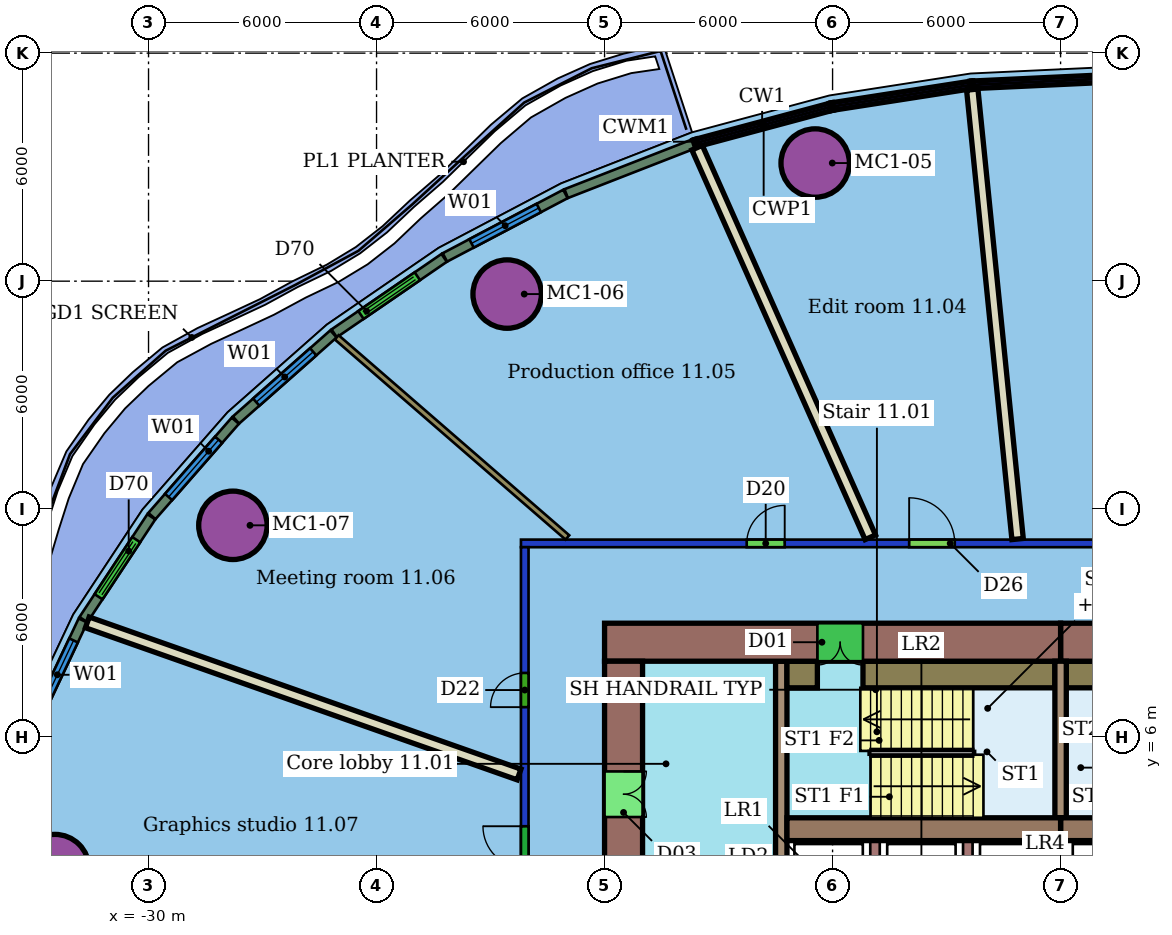
"""IFC4 building model, lengths in metres.
Left out: names, types, materials, properties, quantities, classifications, styles, units other than length and angle.
Written with IfcOpenShell. Run it as: python <this file> out.ifc"""

import sys

from ifc_helpers import new_model, si_unit, direction, frame, frame_2d, origin, origin_2d, place, context, subcontext, project, spatial, rectangle, hollow_circle, extrude, element, fill, save


model = new_model("IFC4")
c1 = context("Model", 3, precision=1e-05, world=origin(), true_north=direction((0.0, 1.0)))
c2 = subcontext(c1, "Body", "Model", "MODEL_VIEW")
j1 = project(units=[si_unit("LENGTHUNIT", "METRE"), si_unit("PLANEANGLEUNIT", "RADIAN")], contexts=[c1])
p1 = place(None, origin())
s1 = spatial("IfcSite", under=j1, at=p1, CompositionType="ELEMENT")
p2 = place(p1, origin())
s2 = spatial("IfcBuilding", under=s1, at=p2, CompositionType="ELEMENT")
p3 = place(p2, frame((0.0, 0.0, 58.2)))
s3 = spatial("IfcBuildingStorey", under=s2, at=p3, CompositionType="ELEMENT", Elevation=58.2)
for number, where, z_axis, x_axis in (
    (1, (-12.458, 21.108, 0.0), (0.0, 0.0, 1.0), (1.0, 0.0, 0.0)),
    (2, (-20.563, 17.66, 0.0), (0.0, 0.0, 1.0), (1.0, 0.0, 0.0)),
    (3, (-27.78, 11.576, 0.0), (0.0, 0.0, 1.0), (1.0, 0.0, 0.0)),
    (4, (-32.464, 2.543, 0.0), (0.0, 0.0, 1.0), (1.0, 0.0, 0.0)),
):
    element("IfcColumn", number, at=place(p3, frame(where, z_axis=z_axis, x_axis=x_axis)), inside=s3, PredefinedType="COLUMN", context=c2, shape_type="SweptSolid", body=[
        extrude(hollow_circle(Radius=0.9, WallThickness=0.06, at=origin_2d()), origin(), (0.0, 0.0, 1.0), 3.55),
    ])
p4 = place(p3, frame((-20.1, -11.0, 0.0), z_axis=(0.0, 0.0, 1.0), x_axis=(0.0, 1.0, 0.0)))
e5 = element("IfcWall", 5, at=p4, inside=s3, PredefinedType="PARTITIONING", context=c2, shape_type="SweptSolid", body=[
    extrude(rectangle(XDim=22.0, YDim=0.2, at=frame_2d((11.0, 0.0))), origin(), (0.0, 0.0, 1.0), 2.85),
])
p5 = place(p4, frame((17.792, 0.0, 0.0)))
e6 = element("IfcOpeningElement", 6, at=p5, cuts=e5, PredefinedType="OPENING", context=c2, shape_type="SweptSolid", body=[
    extrude(rectangle(XDim=0.9, YDim=2.1, at=frame_2d((0.45, 1.05))), frame((0.0, 0.11, 0.0), z_axis=(0.0, -1.0, 0.0), x_axis=(1.0, 0.0, 0.0)), (0.0, 0.0, 1.0), 0.22),
])
p6 = place(p4, frame((13.558, 0.0, 0.0)))
e7 = element("IfcOpeningElement", 7, at=p6, cuts=e5, PredefinedType="OPENING", context=c2, shape_type="SweptSolid", body=[
    extrude(rectangle(XDim=1.1, YDim=2.1, at=frame_2d((0.55, 1.05))), frame((0.0, 0.11, 0.0), z_axis=(0.0, -1.0, 0.0), x_axis=(1.0, 0.0, 0.0)), (0.0, 0.0, 1.0), 0.22),
])
p7 = place(p4, frame((6.45, 0.0, 0.0)))
e8 = element("IfcOpeningElement", 8, at=p7, cuts=e5, PredefinedType="OPENING", context=c2, shape_type="SweptSolid", body=[
    extrude(rectangle(XDim=0.9, YDim=2.1, at=frame_2d((0.45, 1.05))), frame((0.0, 0.11, 0.0), z_axis=(0.0, -1.0, 0.0), x_axis=(1.0, 0.0, 0.0)), (0.0, 0.0, 1.0), 0.22),
])
p8 = place(p4, frame((2.234, 0.0, 0.0)))
e9 = element("IfcOpeningElement", 9, at=p8, cuts=e5, PredefinedType="OPENING", context=c2, shape_type="SweptSolid", body=[
    extrude(rectangle(XDim=1.0, YDim=2.1, at=frame_2d((0.5, 1.05))), frame((0.0, 0.11, 0.0), z_axis=(0.0, -1.0, 0.0), x_axis=(1.0, 0.0, 0.0)), (0.0, 0.0, 1.0), 0.22),
])
p9 = place(p3, frame((-20.2, 11.1, 0.0), z_axis=(0.0, 0.0, 1.0), x_axis=(1.0, 0.0, 0.0)))
e10 = element("IfcWall", 10, at=p9, inside=s3, PredefinedType="PARTITIONING", context=c2, shape_type="SweptSolid", body=[
    extrude(rectangle(XDim=28.4, YDim=0.2, at=frame_2d((14.2, 0.0))), origin(), (0.0, 0.0, 1.0), 2.85),
])
p10 = place(p9, frame((24.235, 0.0, 0.0)))
e11 = element("IfcOpeningElement", 11, at=p10, cuts=e10, PredefinedType="OPENING", context=c2, shape_type="SweptSolid", body=[
    extrude(rectangle(XDim=1.5, YDim=2.1, at=frame_2d((0.75, 1.05))), frame((0.0, 0.11, 0.0), z_axis=(0.0, -1.0, 0.0), x_axis=(1.0, 0.0, 0.0)), (0.0, 0.0, 1.0), 0.22),
])
p11 = place(p9, frame((18.986, 0.0, 0.0)))
e12 = element("IfcOpeningElement", 12, at=p11, cuts=e10, PredefinedType="OPENING", context=c2, shape_type="SweptSolid", body=[
    extrude(rectangle(XDim=1.0, YDim=2.1, at=frame_2d((0.5, 1.05))), frame((0.0, 0.11, 0.0), z_axis=(0.0, -1.0, 0.0), x_axis=(1.0, 0.0, 0.0)), (0.0, 0.0, 1.0), 0.22),
])
p12 = place(p9, frame((10.215, 0.0, 0.0)))
e13 = element("IfcOpeningElement", 13, at=p12, cuts=e10, PredefinedType="OPENING", context=c2, shape_type="SweptSolid", body=[
    extrude(rectangle(XDim=1.2, YDim=2.1, at=frame_2d((0.6, 1.05))), frame((0.0, 0.11, 0.0), z_axis=(0.0, -1.0, 0.0), x_axis=(1.0, 0.0, 0.0)), (0.0, 0.0, 1.0), 0.22),
])
p13 = place(p9, frame((5.94, 0.0, 0.0)))
e14 = element("IfcOpeningElement", 14, at=p13, cuts=e10, PredefinedType="OPENING", context=c2, shape_type="SweptSolid", body=[
    extrude(rectangle(XDim=1.0, YDim=2.1, at=frame_2d((0.5, 1.05))), frame((0.0, 0.11, 0.0), z_axis=(0.0, -1.0, 0.0), x_axis=(1.0, 0.0, 0.0)), (0.0, 0.0, 1.0), 0.22),
])
p14 = place(p3, frame((-8.324, 23.041, 0.0), z_axis=(0.0, 0.0, 1.0), x_axis=(0.100359866634, -0.994951203411, 0.0)))
e15 = element("IfcWall", 15, at=p14, inside=s3, PredefinedType="PARTITIONING", context=c2, shape_type="SweptSolid", body=[
    extrude(rectangle(XDim=11.886, YDim=0.3, at=frame_2d((5.943, 0.0))), origin(), (0.0, 0.0, 1.0), 3.55),
])
p15 = place(p3, frame((-15.565, 21.513, 0.0), z_axis=(0.0, 0.0, 1.0), x_axis=(0.40628180816, -0.913747827553, 0.0)))
e16 = element("IfcWall", 16, at=p15, inside=s3, PredefinedType="PARTITIONING", context=c2, shape_type="SweptSolid", body=[
    extrude(rectangle(XDim=11.22, YDim=0.3, at=frame_2d((5.61, 0.0))), origin(), (0.0, 0.0, 1.0), 3.55),
])
p16 = place(p3, frame((-25.048, 16.521, 0.0), z_axis=(0.0, 0.0, 1.0), x_axis=(0.755432381923, -0.655226614494, 0.0)))
e17 = element("IfcWall", 17, at=p16, inside=s3, PredefinedType="PARTITIONING", context=c2, shape_type="SweptSolid", body=[
    extrude(rectangle(XDim=8.035, YDim=0.15, at=frame_2d((4.018, 0.0))), origin(), (0.0, 0.0, 1.0), 3.55),
])
p17 = place(p3, frame((-31.611, 9.022, 0.0), z_axis=(0.0, 0.0, 1.0), x_axis=(0.943188110721, -0.332259217773, 0.0)))
e18 = element("IfcWall", 18, at=p17, inside=s3, PredefinedType="PARTITIONING", context=c2, shape_type="SweptSolid", body=[
    extrude(rectangle(XDim=12.045, YDim=0.3, at=frame_2d((6.023, 0.0))), origin(), (0.0, 0.0, 1.0), 3.55),
])
p18 = place(p3, frame((-15.655, 21.612, 0.0), z_axis=(0.0, 0.0, 1.0), x_axis=(-0.931645373633, -0.363368817853, 0.0)))
e19 = element("IfcWall", 19, at=p18, inside=s3, PredefinedType="SOLIDWALL", context=c2, shape_type="SweptSolid", body=[
    extrude(rectangle(XDim=3.601, YDim=0.25, at=frame_2d((1.8, 0.0))), origin(), (0.0, 0.0, 1.0), 3.15),
])
p19 = place(p3, frame((-19.03, 20.294, 0.0), z_axis=(0.0, 0.0, 1.0), x_axis=(-0.884873899138, -0.465830637274, 0.0)))
e20 = element("IfcWall", 20, at=p19, inside=s3, PredefinedType="SOLIDWALL", context=c2, shape_type="SweptSolid", body=[
    extrude(rectangle(XDim=3.585, YDim=0.25, at=frame_2d((1.792, 0.0))), origin(), (0.0, 0.0, 1.0), 3.15),
])
p20 = place(p19, frame((0.792, 0.0, 0.8)))
e21 = element("IfcOpeningElement", 21, at=p20, cuts=e20, PredefinedType="OPENING", context=c2, shape_type="SweptSolid", body=[
    extrude(rectangle(XDim=2.0, YDim=2.2, at=frame_2d((1.0, 1.1))), frame((0.0, 0.135, 0.0), z_axis=(0.0, -1.0, 0.0), x_axis=(1.0, 0.0, 0.0)), (0.0, 0.0, 1.0), 0.27),
])
p21 = place(p3, frame((-22.221, 18.613, 0.0), z_axis=(0.0, 0.0, 1.0), x_axis=(-0.824494262273, -0.565870313304, 0.0)))
e22 = element("IfcWall", 22, at=p21, inside=s3, PredefinedType="SOLIDWALL", context=c2, shape_type="SweptSolid", body=[
    extrude(rectangle(XDim=3.51, YDim=0.25, at=frame_2d((1.755, 0.0))), origin(), (0.0, 0.0, 1.0), 3.15),
])
p22 = place(p21, frame((0.855, 0.0, 0.0)))
e23 = element("IfcOpeningElement", 23, at=p22, cuts=e22, PredefinedType="OPENING", context=c2, shape_type="SweptSolid", body=[
    extrude(rectangle(XDim=1.8, YDim=2.4, at=frame_2d((0.9, 1.2))), frame((0.0, 0.135, 0.0), z_axis=(0.0, -1.0, 0.0), x_axis=(1.0, 0.0, 0.0)), (0.0, 0.0, 1.0), 0.27),
])
p23 = place(p3, frame((-25.133, 16.613, 0.0), z_axis=(0.0, 0.0, 1.0), x_axis=(-0.749392432233, -0.662126107711, 0.0)))
e24 = element("IfcWall", 24, at=p23, inside=s3, PredefinedType="SOLIDWALL", context=c2, shape_type="SweptSolid", body=[
    extrude(rectangle(XDim=3.424, YDim=0.25, at=frame_2d((1.712, 0.0))), origin(), (0.0, 0.0, 1.0), 3.15),
])
p24 = place(p23, frame((0.712, 0.0, 0.8)))
e25 = element("IfcOpeningElement", 25, at=p24, cuts=e24, PredefinedType="OPENING", context=c2, shape_type="SweptSolid", body=[
    extrude(rectangle(XDim=2.0, YDim=2.2, at=frame_2d((1.0, 1.1))), frame((0.0, 0.135, 0.0), z_axis=(0.0, -1.0, 0.0), x_axis=(1.0, 0.0, 0.0)), (0.0, 0.0, 1.0), 0.27),
])
p25 = place(p3, frame((-27.716, 14.328, 0.0), z_axis=(0.0, 0.0, 1.0), x_axis=(-0.65843719002, -0.752635679993, 0.0)))
e26 = element("IfcWall", 26, at=p25, inside=s3, PredefinedType="SOLIDWALL", context=c2, shape_type="SweptSolid", body=[
    extrude(rectangle(XDim=3.333, YDim=0.25, at=frame_2d((1.667, 0.0))), origin(), (0.0, 0.0, 1.0), 3.15),
])
p26 = place(p25, frame((0.667, 0.0, 0.8)))
e27 = element("IfcOpeningElement", 27, at=p26, cuts=e26, PredefinedType="OPENING", context=c2, shape_type="SweptSolid", body=[
    extrude(rectangle(XDim=2.0, YDim=2.2, at=frame_2d((1.0, 1.1))), frame((0.0, 0.135, 0.0), z_axis=(0.0, -1.0, 0.0), x_axis=(1.0, 0.0, 0.0)), (0.0, 0.0, 1.0), 0.27),
])
p27 = place(p3, frame((-29.926, 11.8, 0.0), z_axis=(0.0, 0.0, 1.0), x_axis=(-0.550976461362, -0.834520784058, 0.0)))
e28 = element("IfcWall", 28, at=p27, inside=s3, PredefinedType="SOLIDWALL", context=c2, shape_type="SweptSolid", body=[
    extrude(rectangle(XDim=3.243, YDim=0.25, at=frame_2d((1.621, 0.0))), origin(), (0.0, 0.0, 1.0), 3.15),
])
p28 = place(p27, frame((0.721, 0.0, 0.0)))
e29 = element("IfcOpeningElement", 29, at=p28, cuts=e28, PredefinedType="OPENING", context=c2, shape_type="SweptSolid", body=[
    extrude(rectangle(XDim=1.8, YDim=2.4, at=frame_2d((0.9, 1.2))), frame((0.0, 0.135, 0.0), z_axis=(0.0, -1.0, 0.0), x_axis=(1.0, 0.0, 0.0)), (0.0, 0.0, 1.0), 0.27),
])
p29 = place(p3, frame((-31.725, 9.072, 0.0), z_axis=(0.0, 0.0, 1.0), x_axis=(-0.427069496555, -0.904218803781, 0.0)))
e30 = element("IfcWall", 30, at=p29, inside=s3, PredefinedType="SOLIDWALL", context=c2, shape_type="SweptSolid", body=[
    extrude(rectangle(XDim=3.159, YDim=0.25, at=frame_2d((1.58, 0.0))), origin(), (0.0, 0.0, 1.0), 3.15),
])
p30 = place(p29, frame((0.58, 0.0, 0.8)))
e31 = element("IfcOpeningElement", 31, at=p30, cuts=e30, PredefinedType="OPENING", context=c2, shape_type="SweptSolid", body=[
    extrude(rectangle(XDim=2.0, YDim=2.2, at=frame_2d((1.0, 1.1))), frame((0.0, 0.135, 0.0), z_axis=(0.0, -1.0, 0.0), x_axis=(1.0, 0.0, 0.0)), (0.0, 0.0, 1.0), 0.27),
])
p31 = place(p3, frame((6.0, 8.5, 0.0), z_axis=(0.0, 0.0, 1.0), x_axis=(-1.0, 0.0, 0.0)))
e32 = element("IfcWall", 32, at=p31, inside=s3, PredefinedType="SHEAR", context=c2, shape_type="SweptSolid", body=[
    extrude(rectangle(XDim=12.0, YDim=1.0, at=frame_2d((6.0, 0.0))), origin(), (0.0, 0.0, 1.0), 3.4),
])
p32 = place(p31, frame((5.6, 0.0, 0.0)))
e33 = element("IfcOpeningElement", 33, at=p32, cuts=e32, PredefinedType="OPENING", context=c2, shape_type="SweptSolid", body=[
    extrude(rectangle(XDim=1.2, YDim=2.1, at=frame_2d((0.6, 1.05))), frame((0.0, 0.51, 0.0), z_axis=(0.0, -1.0, 0.0), x_axis=(1.0, 0.0, 0.0)), (0.0, 0.0, 1.0), 1.02),
])
p33 = place(p3, frame((-6.0, 8.5, 0.0), z_axis=(0.0, 0.0, 1.0), x_axis=(-1.0, 0.0, 0.0)))
e34 = element("IfcWall", 34, at=p33, inside=s3, PredefinedType="SHEAR", context=c2, shape_type="SweptSolid", body=[
    extrude(rectangle(XDim=12.0, YDim=1.0, at=frame_2d((6.0, 0.0))), origin(), (0.0, 0.0, 1.0), 3.4),
])
p34 = place(p33, frame((5.2, 0.0, 0.0)))
e35 = element("IfcOpeningElement", 35, at=p34, cuts=e34, PredefinedType="OPENING", context=c2, shape_type="SweptSolid", body=[
    extrude(rectangle(XDim=1.2, YDim=2.1, at=frame_2d((0.6, 1.05))), frame((0.0, 0.51, 0.0), z_axis=(0.0, -1.0, 0.0), x_axis=(1.0, 0.0, 0.0)), (0.0, 0.0, 1.0), 1.02),
])
p35 = place(p3, frame((-17.5, 8.0, 0.0), z_axis=(0.0, 0.0, 1.0), x_axis=(0.0, -1.0, 0.0)))
e36 = element("IfcWall", 36, at=p35, inside=s3, PredefinedType="SHEAR", context=c2, shape_type="SweptSolid", body=[
    extrude(rectangle(XDim=16.0, YDim=1.0, at=frame_2d((8.0, 0.0))), origin(), (0.0, 0.0, 1.0), 3.4),
])
p36 = place(p35, frame((11.9, 0.0, 0.0)))
e37 = element("IfcOpeningElement", 37, at=p36, cuts=e36, PredefinedType="OPENING", context=c2, shape_type="SweptSolid", body=[
    extrude(rectangle(XDim=1.2, YDim=2.1, at=frame_2d((0.6, 1.05))), frame((0.0, 0.51, 0.0), z_axis=(0.0, -1.0, 0.0), x_axis=(1.0, 0.0, 0.0)), (0.0, 0.0, 1.0), 1.02),
])
p37 = place(p35, frame((2.9, 0.0, 0.0)))
e38 = element("IfcOpeningElement", 38, at=p37, cuts=e36, PredefinedType="OPENING", context=c2, shape_type="SweptSolid", body=[
    extrude(rectangle(XDim=1.2, YDim=2.1, at=frame_2d((0.6, 1.05))), frame((0.0, 0.51, 0.0), z_axis=(0.0, -1.0, 0.0), x_axis=(1.0, 0.0, 0.0)), (0.0, 0.0, 1.0), 1.02),
])
for number, where, z_axis, x_axis in (
    (39, (-13.2, 3.58, 0.0), (0.0, 0.0, 1.0), (1.0, 0.0, 0.0)),
    (40, (-6.0, 3.58, 0.0), (0.0, 0.0, 1.0), (1.0, 0.0, 0.0)),
):
    element("IfcWall", number, at=place(p3, frame(where, z_axis=z_axis, x_axis=x_axis)), inside=s3, PredefinedType="SHEAR", context=c2, shape_type="SweptSolid", body=[
        extrude(rectangle(XDim=7.2, YDim=0.6, at=frame_2d((3.6, 0.0))), origin(), (0.0, 0.0, 1.0), 3.4),
    ])
p38 = place(p3, frame((-13.35, 8.0, 0.0), z_axis=(0.0, 0.0, 1.0), x_axis=(0.0, -1.0, 0.0)))
e41 = element("IfcWall", 41, at=p38, inside=s3, PredefinedType="SHEAR", context=c2, shape_type="SweptSolid", body=[
    extrude(rectangle(XDim=16.0, YDim=0.3, at=frame_2d((8.0, 0.0))), origin(), (0.0, 0.0, 1.0), 3.4),
])
p39 = place(p38, frame((7.25, 0.0, 0.0)))
e42 = element("IfcOpeningElement", 42, at=p39, cuts=e41, PredefinedType="OPENING", context=c2, shape_type="SweptSolid", body=[
    extrude(rectangle(XDim=1.5, YDim=2.1, at=frame_2d((0.75, 1.05))), frame((0.0, 0.16, 0.0), z_axis=(0.0, -1.0, 0.0), x_axis=(1.0, 0.0, 0.0)), (0.0, 0.0, 1.0), 0.32),
])
p40 = place(p3, frame((-6.0, 3.88, 0.0), z_axis=(0.0, 0.0, 1.0), x_axis=(0.0, 1.0, 0.0)))
e43 = element("IfcWall", 43, at=p40, inside=s3, PredefinedType="SHEAR", context=c2, shape_type="SweptSolid", body=[
    extrude(rectangle(XDim=4.12, YDim=0.3, at=frame_2d((2.06, 0.0))), origin(), (0.0, 0.0, 1.0), 3.4),
])
p41 = place(p3, frame((-13.2, 7.65, 0.0), z_axis=(0.0, 0.0, 1.0), x_axis=(1.0, 0.0, 0.0)))
e44 = element("IfcWall", 44, at=p41, inside=s3, PredefinedType="SHEAR", context=c2, shape_type="SweptSolid", body=[
    extrude(rectangle(XDim=0.8, YDim=0.7, at=frame_2d((0.4, 0.0))), origin(), (0.0, 0.0, 1.0), 3.4),
])
for number, where, z_axis, x_axis in (
    (45, (-11.2, 7.65, 0.0), (0.0, 0.0, 1.0), (1.0, 0.0, 0.0)),
    (46, (-5.85, 7.65, 0.0), (0.0, 0.0, 1.0), (1.0, 0.0, 0.0)),
):
    element("IfcWall", number, at=place(p3, frame(where, z_axis=z_axis, x_axis=x_axis)), inside=s3, PredefinedType="SHEAR", context=c2, shape_type="SweptSolid", body=[
        extrude(rectangle(XDim=5.05, YDim=0.7, at=frame_2d((2.525, 0.0))), origin(), (0.0, 0.0, 1.0), 3.4),
    ])
for number, where, z_axis, x_axis in (
    (47, (-10.883, 1.6, 0.0), (0.0, 0.0, 1.0), (0.0, 1.0, 0.0)),
    (48, (-8.442, 1.6, 0.0), (0.0, 0.0, 1.0), (0.0, 1.0, 0.0)),
    (49, (-6.0, 1.6, 0.0), (0.0, 0.0, 1.0), (0.0, 1.0, 0.0)),
):
    element("IfcWall", number, at=place(p3, frame(where, z_axis=z_axis, x_axis=x_axis)), inside=s3, PredefinedType="SHEAR", context=c2, shape_type="SweptSolid", body=[
        extrude(rectangle(XDim=1.68, YDim=0.25, at=frame_2d((0.84, 0.0))), origin(), (0.0, 0.0, 1.0), 3.4),
    ])
p42 = place(p12, origin())
e50 = element("IfcDoor", 50, at=p42, inside=s3, OperationType="SINGLE_SWING_LEFT", PredefinedType="DOOR", context=c2, shape_type="SweptSolid", body=[
    extrude(rectangle(XDim=1.2, YDim=2.1, at=frame_2d((0.6, 1.05))), frame((0.0, 0.025, 0.0), z_axis=(0.0, -1.0, 0.0), x_axis=(1.0, 0.0, 0.0)), (0.0, 0.0, 1.0), 0.05),
])
fill(e13, e50)
p43 = place(p13, origin())
e51 = element("IfcDoor", 51, at=p43, inside=s3, OperationType="SINGLE_SWING_RIGHT", PredefinedType="DOOR", context=c2, shape_type="SweptSolid", body=[
    extrude(rectangle(XDim=1.0, YDim=2.1, at=frame_2d((0.5, 1.05))), frame((0.0, 0.025, 0.0), z_axis=(0.0, -1.0, 0.0), x_axis=(1.0, 0.0, 0.0)), (0.0, 0.0, 1.0), 0.05),
])
fill(e14, e51)
p44 = place(p5, origin())
e52 = element("IfcDoor", 52, at=p44, inside=s3, OperationType="SINGLE_SWING_LEFT", PredefinedType="DOOR", context=c2, shape_type="SweptSolid", body=[
    extrude(rectangle(XDim=0.9, YDim=2.1, at=frame_2d((0.45, 1.05))), frame((0.0, 0.025, 0.0), z_axis=(0.0, -1.0, 0.0), x_axis=(1.0, 0.0, 0.0)), (0.0, 0.0, 1.0), 0.05),
])
fill(e6, e52)
p45 = place(p6, origin())
e53 = element("IfcDoor", 53, at=p45, inside=s3, OperationType="SINGLE_SWING_RIGHT", PredefinedType="DOOR", context=c2, shape_type="SweptSolid", body=[
    extrude(rectangle(XDim=1.1, YDim=2.1, at=frame_2d((0.55, 1.05))), frame((0.0, 0.025, 0.0), z_axis=(0.0, -1.0, 0.0), x_axis=(1.0, 0.0, 0.0)), (0.0, 0.0, 1.0), 0.05),
])
fill(e7, e53)
p46 = place(p20, origin())
e54 = element("IfcWindow", 54, at=p46, inside=s3, PartitioningType="SINGLE_PANEL", PredefinedType="WINDOW", context=c2, shape_type="SweptSolid", body=[
    extrude(rectangle(XDim=2.0, YDim=2.2, at=frame_2d((1.0, 1.1))), frame((0.0, 0.03, 0.0), z_axis=(0.0, -1.0, 0.0), x_axis=(1.0, 0.0, 0.0)), (0.0, 0.0, 1.0), 0.06),
])
fill(e21, e54)
p47 = place(p22, origin())
e55 = element("IfcDoor", 55, at=p47, inside=s3, OperationType="DOUBLE_DOOR_SLIDING", PredefinedType="DOOR", context=c2, shape_type="SweptSolid", body=[
    extrude(rectangle(XDim=1.8, YDim=2.4, at=frame_2d((0.9, 1.2))), frame((0.0, 0.025, 0.0), z_axis=(0.0, -1.0, 0.0), x_axis=(1.0, 0.0, 0.0)), (0.0, 0.0, 1.0), 0.05),
])
fill(e23, e55)
p48 = place(p24, origin())
e56 = element("IfcWindow", 56, at=p48, inside=s3, PartitioningType="SINGLE_PANEL", PredefinedType="WINDOW", context=c2, shape_type="SweptSolid", body=[
    extrude(rectangle(XDim=2.0, YDim=2.2, at=frame_2d((1.0, 1.1))), frame((0.0, 0.03, 0.0), z_axis=(0.0, -1.0, 0.0), x_axis=(1.0, 0.0, 0.0)), (0.0, 0.0, 1.0), 0.06),
])
fill(e25, e56)
p49 = place(p26, origin())
e57 = element("IfcWindow", 57, at=p49, inside=s3, PartitioningType="SINGLE_PANEL", PredefinedType="WINDOW", context=c2, shape_type="SweptSolid", body=[
    extrude(rectangle(XDim=2.0, YDim=2.2, at=frame_2d((1.0, 1.1))), frame((0.0, 0.03, 0.0), z_axis=(0.0, -1.0, 0.0), x_axis=(1.0, 0.0, 0.0)), (0.0, 0.0, 1.0), 0.06),
])
fill(e27, e57)
p50 = place(p28, origin())
e58 = element("IfcDoor", 58, at=p50, inside=s3, OperationType="DOUBLE_DOOR_SLIDING", PredefinedType="DOOR", context=c2, shape_type="SweptSolid", body=[
    extrude(rectangle(XDim=1.8, YDim=2.4, at=frame_2d((0.9, 1.2))), frame((0.0, 0.025, 0.0), z_axis=(0.0, -1.0, 0.0), x_axis=(1.0, 0.0, 0.0)), (0.0, 0.0, 1.0), 0.05),
])
fill(e29, e58)
p51 = place(p30, origin())
e59 = element("IfcWindow", 59, at=p51, inside=s3, PartitioningType="SINGLE_PANEL", PredefinedType="WINDOW", context=c2, shape_type="SweptSolid", body=[
    extrude(rectangle(XDim=2.0, YDim=2.2, at=frame_2d((1.0, 1.1))), frame((0.0, 0.03, 0.0), z_axis=(0.0, -1.0, 0.0), x_axis=(1.0, 0.0, 0.0)), (0.0, 0.0, 1.0), 0.06),
])
fill(e31, e59)
p52 = place(p34, origin())
e60 = element("IfcDoor", 60, at=p52, inside=s3, OperationType="DOUBLE_DOOR_SINGLE_SWING", PredefinedType="NOTDEFINED", context=c2, shape_type="SweptSolid", body=[
    extrude(rectangle(XDim=1.2, YDim=2.1, at=frame_2d((0.6, 1.05))), frame((0.0, 0.025, 0.0), z_axis=(0.0, -1.0, 0.0), x_axis=(1.0, 0.0, 0.0)), (0.0, 0.0, 1.0), 0.05),
])
fill(e35, e60)
p53 = place(p37, origin())
e61 = element("IfcDoor", 61, at=p53, inside=s3, OperationType="DOUBLE_DOOR_SINGLE_SWING", PredefinedType="NOTDEFINED", context=c2, shape_type="SweptSolid", body=[
    extrude(rectangle(XDim=1.2, YDim=2.1, at=frame_2d((0.6, 1.05))), frame((0.0, 0.025, 0.0), z_axis=(0.0, -1.0, 0.0), x_axis=(1.0, 0.0, 0.0)), (0.0, 0.0, 1.0), 0.05),
])
fill(e38, e61)
save(model, sys.argv[1])
